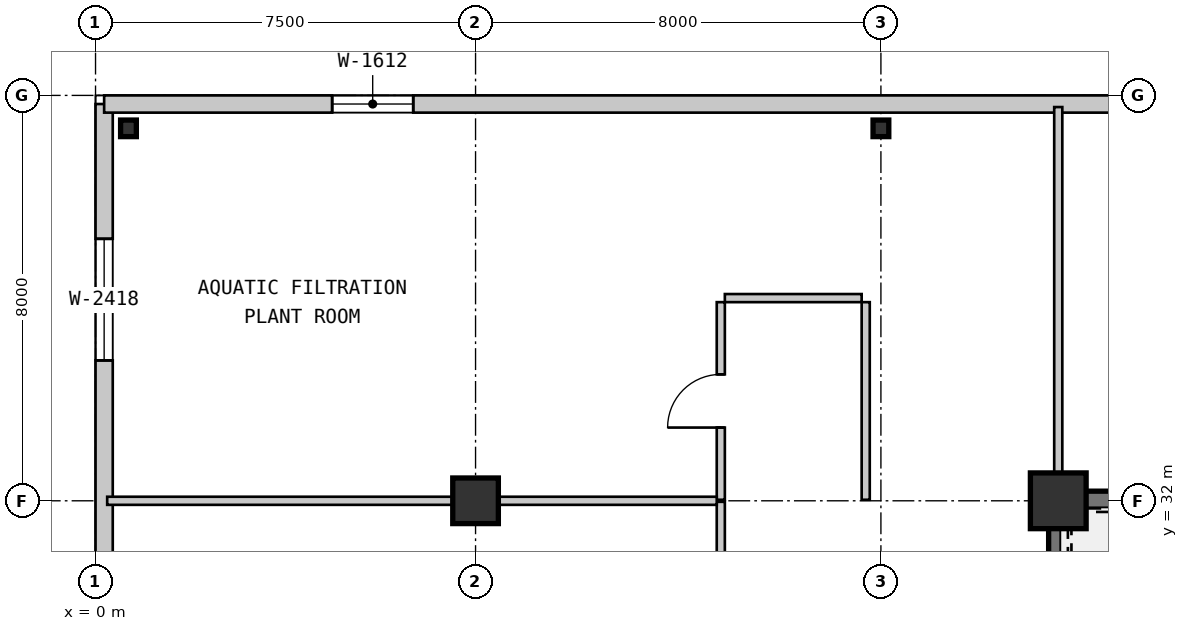
"""IFC4 building model, lengths in metres.
Left out: names, types, materials, properties, quantities, classifications, styles, units other than length and angle.
Written with IfcOpenShell. Run it as: python <this file> out.ifc"""

import sys

from ifc_helpers import new_model, si_unit, direction, frame, frame_2d, origin, origin_2d, place, context, subcontext, project, spatial, rectangle, circle, i_section, extrude, source, transform, mapped, element, fill, save


model = new_model("IFC4")
c1 = context("Model", 3, precision=1e-05, world=origin(), true_north=direction((0.0, 1.0)))
c2 = subcontext(c1, "Body", "Model", "MODEL_VIEW")
j1 = project(units=[si_unit("LENGTHUNIT", "METRE"), si_unit("PLANEANGLEUNIT", "RADIAN")], contexts=[c1])
p1 = place(None, origin())
s1 = spatial("IfcSite", under=j1, at=p1, CompositionType="ELEMENT")
p2 = place(p1, origin())
s2 = spatial("IfcBuilding", under=s1, at=p2, CompositionType="ELEMENT")
p3 = place(p2, frame((0.0, 0.0, 8.4)))
s3 = spatial("IfcBuildingStorey", under=s2, at=p3, CompositionType="ELEMENT", Elevation=8.4)
m1 = source(origin(), c2, "Body", "SweptSolid", [
    extrude(rectangle(XDim=1.1, YDim=1.1, at=origin_2d()), origin(), (0.0, 0.0, 1.0), 4.55),
])
p4 = place(p3, frame((19.0, 32.0, 0.0), z_axis=(0.0, 0.0, 1.0), x_axis=(1.0, 0.0, 0.0)))
e1 = element("IfcColumn", 1, at=p4, inside=s3, PredefinedType="COLUMN", context=c2, shape_type="MappedRepresentation", body=[
    mapped(m1, transform((0.0, 0.0, 0.0), scale=1.0)),
])
m2 = source(origin(), c2, "Body", "SweptSolid", [
    extrude(circle(Radius=0.45, at=origin_2d()), origin(), (0.0, 0.0, 1.0), 4.55),
])
p5 = place(p3, frame((7.5, 32.0, 0.0), z_axis=(0.0, 0.0, 1.0), x_axis=(1.0, 0.0, 0.0)))
e2 = element("IfcColumn", 2, at=p5, inside=s3, PredefinedType="COLUMN", context=c2, shape_type="MappedRepresentation", body=[
    mapped(m2, transform((0.0, 0.0, 0.0), scale=1.0)),
])
m3 = source(origin(), c2, "Body", "SweptSolid", [
    extrude(i_section(OverallWidth=0.311, OverallDepth=0.327, WebThickness=0.016, FlangeThickness=0.025, at=origin_2d()), origin(), (0.0, 0.0, 1.0), 4.55),
])
for number, where, z_axis, x_axis in (
    (3, (0.65, 39.35, 0.0), (0.0, 0.0, 1.0), (1.0, 0.0, 0.0)),
    (4, (15.5, 39.35, 0.0), (0.0, 0.0, 1.0), (1.0, 0.0, 0.0)),
):
    element("IfcColumn", number, at=place(p3, frame(where, z_axis=z_axis, x_axis=x_axis)), inside=s3, PredefinedType="COLUMN", context=c2, shape_type="MappedRepresentation", body=[
        mapped(m3, transform((0.0, 0.0, 0.0), scale=1.0)),
    ])
m4 = source(origin(), c2, "Body", "SweptSolid", [
    extrude(rectangle(XDim=39.66, YDim=0.34, at=frame_2d((19.83, 0.0))), origin(), (0.0, 0.0, 1.0), 4.29),
])
p6 = place(p3, frame((0.17, 0.17, 0.0), z_axis=(0.0, 0.0, 1.0), x_axis=(0.0, 1.0, 0.0)))
e5 = element("IfcWall", 5, at=p6, inside=s3, PredefinedType="SOLIDWALL", context=c2, shape_type="MappedRepresentation", body=[
    mapped(m4, transform((0.0, 0.0, 0.0), scale=1.0)),
])
m5 = source(origin(), c2, "Body", "SweptSolid", [
    extrude(rectangle(XDim=1.8, YDim=1.6, at=frame_2d((0.9, 0.8))), frame((0.0, 0.18, 0.0), z_axis=(0.0, -1.0, 0.0), x_axis=(1.0, 0.0, 0.0)), (0.0, 0.0, 1.0), 0.36),
])
p7 = place(p6, frame((3.2, 0.0, 0.95)))
e6 = element("IfcOpeningElement", 6, at=p7, cuts=e5, PredefinedType="OPENING", context=c2, shape_type="MappedRepresentation", body=[
    mapped(m5, transform((0.0, 0.0, 0.0), scale=1.0)),
])
m6 = source(origin(), c2, "Body", "SweptSolid", [
    extrude(rectangle(XDim=1.5, YDim=1.5, at=frame_2d((0.75, 0.75))), frame((0.0, 0.18, 0.0), z_axis=(0.0, -1.0, 0.0), x_axis=(1.0, 0.0, 0.0)), (0.0, 0.0, 1.0), 0.36),
])
p8 = place(p6, frame((7.8, 0.0, 0.95)))
e7 = element("IfcOpeningElement", 7, at=p8, cuts=e5, PredefinedType="OPENING", context=c2, shape_type="MappedRepresentation", body=[
    mapped(m6, transform((0.0, 0.0, 0.0), scale=1.0)),
])
m7 = source(origin(), c2, "Body", "SweptSolid", [
    extrude(rectangle(XDim=1.2, YDim=1.5, at=frame_2d((0.6, 0.75))), frame((0.0, 0.18, 0.0), z_axis=(0.0, -1.0, 0.0), x_axis=(1.0, 0.0, 0.0)), (0.0, 0.0, 1.0), 0.36),
])
p9 = place(p6, frame((21.2, 0.0, 0.95)))
e8 = element("IfcOpeningElement", 8, at=p9, cuts=e5, PredefinedType="OPENING", context=c2, shape_type="MappedRepresentation", body=[
    mapped(m7, transform((0.0, 0.0, 0.0), scale=1.0)),
])
m8 = source(origin(), c2, "Body", "SweptSolid", [
    extrude(rectangle(XDim=2.4, YDim=1.8, at=frame_2d((1.2, 0.9))), frame((0.0, 0.18, 0.0), z_axis=(0.0, -1.0, 0.0), x_axis=(1.0, 0.0, 0.0)), (0.0, 0.0, 1.0), 0.36),
])
p10 = place(p6, frame((34.6, 0.0, 0.95)))
e9 = element("IfcOpeningElement", 9, at=p10, cuts=e5, PredefinedType="OPENING", context=c2, shape_type="MappedRepresentation", body=[
    mapped(m8, transform((0.0, 0.0, 0.0), scale=1.0)),
])
m9 = source(origin(), c2, "Body", "SweptSolid", [
    extrude(rectangle(XDim=69.66, YDim=0.34, at=frame_2d((34.83, 0.0))), origin(), (0.0, 0.0, 1.0), 4.29),
])
p11 = place(p3, frame((0.17, 39.83, 0.0), z_axis=(0.0, 0.0, 1.0), x_axis=(1.0, 0.0, 0.0)))
e10 = element("IfcWall", 10, at=p11, inside=s3, PredefinedType="SOLIDWALL", context=c2, shape_type="MappedRepresentation", body=[
    mapped(m9, transform((0.0, 0.0, 0.0), scale=1.0)),
])
m10 = source(origin(), c2, "Body", "SweptSolid", [
    extrude(rectangle(XDim=1.6, YDim=1.2, at=frame_2d((0.8, 0.6))), frame((0.0, 0.18, 0.0), z_axis=(0.0, -1.0, 0.0), x_axis=(1.0, 0.0, 0.0)), (0.0, 0.0, 1.0), 0.36),
])
p12 = place(p11, frame((4.5, 0.0, 0.95)))
e11 = element("IfcOpeningElement", 11, at=p12, cuts=e10, PredefinedType="OPENING", context=c2, shape_type="MappedRepresentation", body=[
    mapped(m10, transform((0.0, 0.0, 0.0), scale=1.0)),
])
p13 = place(p11, frame((22.5, 0.0, 0.95)))
e12 = element("IfcOpeningElement", 12, at=p13, cuts=e10, PredefinedType="OPENING", context=c2, shape_type="MappedRepresentation", body=[
    mapped(m10, transform((0.0, 0.0, 0.0), scale=1.0)),
])
p14 = place(p11, frame((29.0, 0.0, 0.95)))
e13 = element("IfcOpeningElement", 13, at=p14, cuts=e10, PredefinedType="OPENING", context=c2, shape_type="MappedRepresentation", body=[
    mapped(m10, transform((0.0, 0.0, 0.0), scale=1.0)),
])
p15 = place(p11, frame((40.5, 0.0, 0.95)))
e14 = element("IfcOpeningElement", 14, at=p15, cuts=e10, PredefinedType="OPENING", context=c2, shape_type="MappedRepresentation", body=[
    mapped(m10, transform((0.0, 0.0, 0.0), scale=1.0)),
])
p16 = place(p11, frame((46.5, 0.0, 0.95)))
e15 = element("IfcOpeningElement", 15, at=p16, cuts=e10, PredefinedType="OPENING", context=c2, shape_type="MappedRepresentation", body=[
    mapped(m10, transform((0.0, 0.0, 0.0), scale=1.0)),
])
p17 = place(p11, frame((62.5, 0.0, 0.95)))
e16 = element("IfcOpeningElement", 16, at=p17, cuts=e10, PredefinedType="OPENING", context=c2, shape_type="MappedRepresentation", body=[
    mapped(m10, transform((0.0, 0.0, 0.0), scale=1.0)),
])
m11 = source(origin(), c2, "Body", "SweptSolid", [
    extrude(rectangle(XDim=9.19, YDim=0.38, at=frame_2d((4.595, 0.0))), origin(), (0.0, 0.0, 1.0), 4.29),
])
p18 = place(p3, frame((18.81, 32.0, 0.0), z_axis=(0.0, 0.0, 1.0), x_axis=(1.0, 0.0, 0.0)))
e17 = element("IfcWall", 17, at=p18, inside=s3, PredefinedType="SHEAR", context=c2, shape_type="MappedRepresentation", body=[
    mapped(m11, transform((0.0, 0.0, 0.0), scale=1.0)),
])
m12 = source(origin(), c2, "Body", "SweptSolid", [
    extrude(rectangle(XDim=3.61, YDim=0.38, at=frame_2d((1.805, 0.0))), origin(), (0.0, 0.0, 1.0), 4.29),
])
p19 = place(p3, frame((19.0, 28.2, 0.0), z_axis=(0.0, 0.0, 1.0), x_axis=(0.0, 1.0, 0.0)))
e18 = element("IfcWall", 18, at=p19, inside=s3, PredefinedType="SHEAR", context=c2, shape_type="MappedRepresentation", body=[
    mapped(m12, transform((0.0, 0.0, 0.0), scale=1.0)),
])
m13 = source(origin(), c2, "Body", "SweptSolid", [
    extrude(rectangle(XDim=7.9, YDim=0.16, at=frame_2d((3.95, 0.0))), origin(), (0.0, 0.0, 1.0), 4.29),
])
p20 = place(p3, frame((12.34, 24.08, 0.0), z_axis=(0.0, 0.0, 1.0), x_axis=(0.0, 1.0, 0.0)))
e19 = element("IfcWall", 19, at=p20, inside=s3, PredefinedType="PARTITIONING", context=c2, shape_type="MappedRepresentation", body=[
    mapped(m13, transform((0.0, 0.0, 0.0), scale=1.0)),
])
m14 = source(origin(), c2, "Body", "SweptSolid", [
    extrude(rectangle(XDim=1.05, YDim=2.1, at=frame_2d((0.525, 1.05))), frame((0.0, 0.09, 0.0), z_axis=(0.0, -1.0, 0.0), x_axis=(1.0, 0.0, 0.0)), (0.0, 0.0, 1.0), 0.18),
])
p21 = place(p20, frame((3.395, 0.0, 0.0)))
e20 = element("IfcOpeningElement", 20, at=p21, cuts=e19, PredefinedType="OPENING", context=c2, shape_type="MappedRepresentation", body=[
    mapped(m14, transform((0.0, 0.0, 0.0), scale=1.0)),
])
m15 = source(origin(), c2, "Body", "SweptSolid", [
    extrude(rectangle(XDim=3.9, YDim=0.16, at=frame_2d((1.95, 0.0))), origin(), (0.0, 0.0, 1.0), 4.29),
])
p22 = place(p3, frame((12.34, 32.02, 0.0), z_axis=(0.0, 0.0, 1.0), x_axis=(0.0, 1.0, 0.0)))
e21 = element("IfcWall", 21, at=p22, inside=s3, PredefinedType="PARTITIONING", context=c2, shape_type="MappedRepresentation", body=[
    mapped(m15, transform((0.0, 0.0, 0.0), scale=1.0)),
])
p23 = place(p22, frame((1.425, 0.0, 0.0)))
e22 = element("IfcOpeningElement", 22, at=p23, cuts=e21, PredefinedType="OPENING", context=c2, shape_type="MappedRepresentation", body=[
    mapped(m14, transform((0.0, 0.0, 0.0), scale=1.0)),
])
p24 = place(p3, frame((15.2, 35.92, 0.0), z_axis=(0.0, 0.0, 1.0), x_axis=(0.0, -1.0, 0.0)))
e23 = element("IfcWall", 23, at=p24, inside=s3, PredefinedType="PARTITIONING", context=c2, shape_type="MappedRepresentation", body=[
    mapped(m15, transform((0.0, 0.0, 0.0), scale=1.0)),
])
m16 = source(origin(), c2, "Body", "SweptSolid", [
    extrude(rectangle(XDim=2.7, YDim=0.16, at=frame_2d((1.35, 0.0))), origin(), (0.0, 0.0, 1.0), 4.29),
])
p25 = place(p3, frame((12.42, 36.0, 0.0), z_axis=(0.0, 0.0, 1.0), x_axis=(1.0, 0.0, 0.0)))
e24 = element("IfcWall", 24, at=p25, inside=s3, PredefinedType="PARTITIONING", context=c2, shape_type="MappedRepresentation", body=[
    mapped(m16, transform((0.0, 0.0, 0.0), scale=1.0)),
])
m17 = source(origin(), c2, "Body", "SweptSolid", [
    extrude(rectangle(XDim=7.27, YDim=0.16, at=frame_2d((3.635, 0.0))), origin(), (0.0, 0.0, 1.0), 4.29),
])
p26 = place(p3, frame((0.23, 32.0, 0.0), z_axis=(0.0, 0.0, 1.0), x_axis=(1.0, 0.0, 0.0)))
e25 = element("IfcWall", 25, at=p26, inside=s3, PredefinedType="PARTITIONING", context=c2, shape_type="MappedRepresentation", body=[
    mapped(m17, transform((0.0, 0.0, 0.0), scale=1.0)),
])
m18 = source(origin(), c2, "Body", "SweptSolid", [
    extrude(rectangle(XDim=4.76, YDim=0.16, at=frame_2d((2.38, 0.0))), origin(), (0.0, 0.0, 1.0), 3.757),
])
p27 = place(p3, frame((7.5, 32.0, 0.0), z_axis=(0.0, 0.0, 1.0), x_axis=(1.0, 0.0, 0.0)))
e26 = element("IfcWall", 26, at=p27, inside=s3, PredefinedType="PARTITIONING", context=c2, shape_type="MappedRepresentation", body=[
    mapped(m18, transform((0.0, 0.0, 0.0), scale=1.0)),
])
m19 = source(origin(), c2, "Body", "SweptSolid", [
    extrude(rectangle(XDim=7.58, YDim=0.16, at=frame_2d((3.79, 0.0))), origin(), (0.0, 0.0, 1.0), 4.29),
])
p28 = place(p3, frame((19.0, 39.77, 0.0), z_axis=(0.0, 0.0, 1.0), x_axis=(0.0, -1.0, 0.0)))
e27 = element("IfcWall", 27, at=p28, inside=s3, PredefinedType="PARTITIONING", context=c2, shape_type="MappedRepresentation", body=[
    mapped(m19, transform((0.0, 0.0, 0.0), scale=1.0)),
])
m20 = source(origin(), c2, "Body", "SweptSolid", [
    extrude(rectangle(XDim=2.4, YDim=1.8, at=frame_2d((1.2, 0.9))), frame((0.0, 0.03, 0.0), z_axis=(0.0, -1.0, 0.0), x_axis=(1.0, 0.0, 0.0)), (0.0, 0.0, 1.0), 0.06),
])
p29 = place(p10, origin())
e28 = element("IfcWindow", 28, at=p29, inside=s3, PartitioningType="SINGLE_PANEL", PredefinedType="WINDOW", context=c2, shape_type="MappedRepresentation", body=[
    mapped(m20, transform((0.0, 0.0, 0.0), scale=1.0)),
])
fill(e9, e28)
m21 = source(origin(), c2, "Body", "SweptSolid", [
    extrude(rectangle(XDim=1.6, YDim=1.2, at=frame_2d((0.8, 0.6))), frame((0.0, 0.03, 0.0), z_axis=(0.0, -1.0, 0.0), x_axis=(1.0, 0.0, 0.0)), (0.0, 0.0, 1.0), 0.06),
])
p30 = place(p12, origin())
e29 = element("IfcWindow", 29, at=p30, inside=s3, PartitioningType="SINGLE_PANEL", PredefinedType="WINDOW", context=c2, shape_type="MappedRepresentation", body=[
    mapped(m21, transform((0.0, 0.0, 0.0), scale=1.0)),
])
fill(e11, e29)
m22 = source(origin(), c2, "Body", "SweptSolid", [
    extrude(rectangle(XDim=1.05, YDim=2.1, at=frame_2d((0.525, 1.05))), frame((0.0, 0.025, 0.0), z_axis=(0.0, -1.0, 0.0), x_axis=(1.0, 0.0, 0.0)), (0.0, 0.0, 1.0), 0.05),
])
p31 = place(p23, origin())
e30 = element("IfcDoor", 30, at=p31, inside=s3, OperationType="SINGLE_SWING_LEFT", PredefinedType="DOOR", context=c2, shape_type="MappedRepresentation", body=[
    mapped(m22, transform((0.0, 0.0, 0.0), scale=1.0)),
])
fill(e22, e30)
save(model, sys.argv[1])
